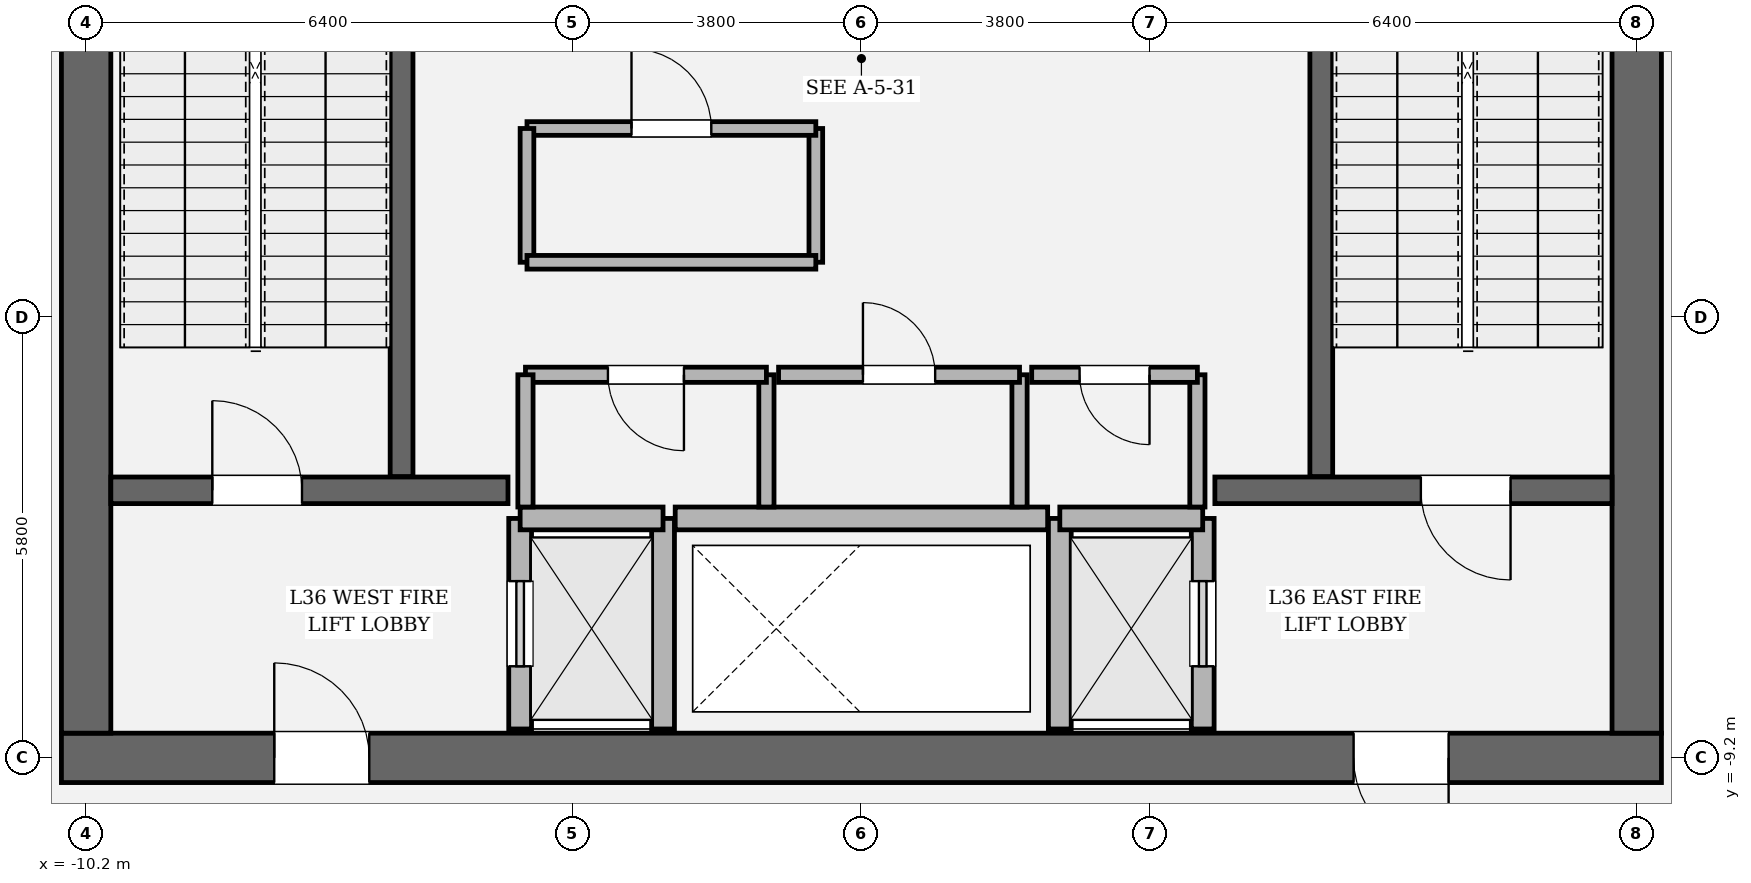
"""IFC4 building model, lengths in metres.
Left out: names, types, materials, properties, quantities, classifications, styles, units other than length and angle.
Written with IfcOpenShell. Run it as: python <this file> out.ifc"""

import sys

from ifc_helpers import new_model, si_unit, direction, frame, frame_2d, origin, place, context, subcontext, project, spatial, rectangle, extrude, element, fill, save


model = new_model("IFC4")
c1 = context("Model", 3, precision=1e-05, world=origin(), true_north=direction((0.0, 1.0)))
c2 = subcontext(c1, "Body", "Model", "MODEL_VIEW")
j1 = project(units=[si_unit("LENGTHUNIT", "METRE"), si_unit("PLANEANGLEUNIT", "RADIAN")], contexts=[c1])
p1 = place(None, origin())
s1 = spatial("IfcSite", under=j1, at=p1, CompositionType="ELEMENT")
p2 = place(p1, origin())
s2 = spatial("IfcBuilding", under=s1, at=p2, CompositionType="ELEMENT")
p3 = place(p2, frame((0.0, 0.0, 156.0)))
s3 = spatial("IfcBuildingStorey", under=s2, at=p3, CompositionType="ELEMENT", Elevation=156.0)
p4 = place(p3, frame((10.525, -9.2, 0.0), z_axis=(0.0, 0.0, 1.0), x_axis=(-1.0, 0.0, 0.0)))
e1 = element("IfcWall", 1, at=p4, inside=s3, PredefinedType="SHEAR", context=c2, shape_type="SweptSolid", body=[
    extrude(rectangle(XDim=21.05, YDim=0.65, at=frame_2d((10.525, 0.0))), origin(), (0.0, 0.0, 1.0), 4.05),
])
p5 = place(p4, frame((2.8, 0.0, 0.0)))
e2 = element("IfcOpeningElement", 2, at=p5, cuts=e1, PredefinedType="OPENING", context=c2, shape_type="SweptSolid", body=[
    extrude(rectangle(XDim=1.25, YDim=2.25, at=frame_2d((0.625, 1.125))), frame((0.0, 0.335, 0.0), z_axis=(0.0, -1.0, 0.0), x_axis=(1.0, 0.0, 0.0)), (0.0, 0.0, 1.0), 0.67),
])
p6 = place(p4, frame((17.0, 0.0, 0.0)))
e3 = element("IfcOpeningElement", 3, at=p6, cuts=e1, PredefinedType="OPENING", context=c2, shape_type="SweptSolid", body=[
    extrude(rectangle(XDim=1.25, YDim=2.25, at=frame_2d((0.625, 1.125))), frame((0.0, 0.335, 0.0), z_axis=(0.0, -1.0, 0.0), x_axis=(1.0, 0.0, 0.0)), (0.0, 0.0, 1.0), 0.67),
])
p7 = place(p3, frame((-10.2, -8.875, 0.0), z_axis=(0.0, 0.0, 1.0), x_axis=(0.0, 1.0, 0.0)))
e4 = element("IfcWall", 4, at=p7, inside=s3, PredefinedType="SHEAR", context=c2, shape_type="SweptSolid", body=[
    extrude(rectangle(XDim=17.75, YDim=0.65, at=frame_2d((8.875, 0.0))), origin(), (0.0, 0.0, 1.0), 4.05),
])
p8 = place(p7, frame((12.665, 0.0, 0.0)))
e5 = element("IfcOpeningElement", 5, at=p8, cuts=e4, PredefinedType="OPENING", context=c2, shape_type="SweptSolid", body=[
    extrude(rectangle(XDim=1.18, YDim=2.2, at=frame_2d((0.59, 1.1))), frame((0.0, 0.335, 0.0), z_axis=(0.0, -1.0, 0.0), x_axis=(1.0, 0.0, 0.0)), (0.0, 0.0, 1.0), 0.67),
])
p9 = place(p3, frame((10.2, 8.875, 0.0), z_axis=(0.0, 0.0, 1.0), x_axis=(0.0, -1.0, 0.0)))
e6 = element("IfcWall", 6, at=p9, inside=s3, PredefinedType="SHEAR", context=c2, shape_type="SweptSolid", body=[
    extrude(rectangle(XDim=17.75, YDim=0.65, at=frame_2d((8.875, 0.0))), origin(), (0.0, 0.0, 1.0), 4.05),
])
p10 = place(p9, frame((3.905, 0.0, 0.0)))
e7 = element("IfcOpeningElement", 7, at=p10, cuts=e6, PredefinedType="OPENING", context=c2, shape_type="SweptSolid", body=[
    extrude(rectangle(XDim=1.18, YDim=2.2, at=frame_2d((0.59, 1.1))), frame((0.0, 0.335, 0.0), z_axis=(0.0, -1.0, 0.0), x_axis=(1.0, 0.0, 0.0)), (0.0, 0.0, 1.0), 0.67),
])
for number, where, z_axis, x_axis in (
    (8, (-6.05, -5.5, 0.0), (0.0, 0.0, 1.0), (0.0, 1.0, 0.0)),
    (9, (6.05, 3.45, 0.0), (0.0, 0.0, 1.0), (0.0, -1.0, 0.0)),
):
    element("IfcWall", number, at=place(p3, frame(where, z_axis=z_axis, x_axis=x_axis)), inside=s3, PredefinedType="SOLIDWALL", context=c2, shape_type="SweptSolid", body=[
        extrude(rectangle(XDim=8.95, YDim=0.3, at=frame_2d((4.475, 0.0))), origin(), (0.0, 0.0, 1.0), 4.05),
    ])
p11 = place(p3, frame((-9.875, -5.68, 0.0), z_axis=(0.0, 0.0, 1.0), x_axis=(1.0, 0.0, 0.0)))
e10 = element("IfcWall", 10, at=p11, inside=s3, PredefinedType="SOLIDWALL", context=c2, shape_type="SweptSolid", body=[
    extrude(rectangle(XDim=5.225, YDim=0.35, at=frame_2d((2.613, 0.0))), origin(), (0.0, 0.0, 1.0), 4.05),
])
p12 = place(p11, frame((1.335, 0.0, 0.0)))
e11 = element("IfcOpeningElement", 11, at=p12, cuts=e10, PredefinedType="OPENING", context=c2, shape_type="SweptSolid", body=[
    extrude(rectangle(XDim=1.18, YDim=2.2, at=frame_2d((0.59, 1.1))), frame((0.0, 0.185, 0.0), z_axis=(0.0, -1.0, 0.0), x_axis=(1.0, 0.0, 0.0)), (0.0, 0.0, 1.0), 0.37),
])
p13 = place(p3, frame((4.65, -5.68, 0.0), z_axis=(0.0, 0.0, 1.0), x_axis=(1.0, 0.0, 0.0)))
e12 = element("IfcWall", 12, at=p13, inside=s3, PredefinedType="SOLIDWALL", context=c2, shape_type="SweptSolid", body=[
    extrude(rectangle(XDim=5.225, YDim=0.35, at=frame_2d((2.613, 0.0))), origin(), (0.0, 0.0, 1.0), 4.05),
])
p14 = place(p13, frame((2.71, 0.0, 0.0)))
e13 = element("IfcOpeningElement", 13, at=p14, cuts=e12, PredefinedType="OPENING", context=c2, shape_type="SweptSolid", body=[
    extrude(rectangle(XDim=1.18, YDim=2.2, at=frame_2d((0.59, 1.1))), frame((0.0, 0.185, 0.0), z_axis=(0.0, -1.0, 0.0), x_axis=(1.0, 0.0, 0.0)), (0.0, 0.0, 1.0), 0.37),
])
p15 = place(p3, frame((-4.49, -8.82, 0.0), z_axis=(0.0, 0.0, 1.0), x_axis=(0.0, 1.0, 0.0)))
e14 = element("IfcWall", 14, at=p15, inside=s3, PredefinedType="SOLIDWALL", context=c2, shape_type="SweptSolid", body=[
    extrude(rectangle(XDim=2.77, YDim=0.3, at=frame_2d((1.385, 0.0))), origin(), (0.0, 0.0, 1.0), 3.83),
])
p16 = place(p15, frame((0.825, 0.0, 0.0)))
e15 = element("IfcOpeningElement", 15, at=p16, cuts=e14, PredefinedType="OPENING", context=c2, shape_type="SweptSolid", body=[
    extrude(rectangle(XDim=1.12, YDim=2.25, at=frame_2d((0.56, 1.125))), frame((0.0, 0.16, 0.0), z_axis=(0.0, -1.0, 0.0), x_axis=(1.0, 0.0, 0.0)), (0.0, 0.0, 1.0), 0.32),
])
p17 = place(p3, frame((-2.61, -8.82, 0.0), z_axis=(0.0, 0.0, 1.0), x_axis=(0.0, 1.0, 0.0)))
e16 = element("IfcWall", 16, at=p17, inside=s3, PredefinedType="SOLIDWALL", context=c2, shape_type="SweptSolid", body=[
    extrude(rectangle(XDim=2.77, YDim=0.3, at=frame_2d((1.385, 0.0))), origin(), (0.0, 0.0, 1.0), 3.83),
])
p18 = place(p3, frame((-4.49, -6.05, 0.0), z_axis=(0.0, 0.0, 1.0), x_axis=(1.0, 0.0, 0.0)))
e17 = element("IfcWall", 17, at=p18, inside=s3, PredefinedType="SOLIDWALL", context=c2, shape_type="SweptSolid", body=[
    extrude(rectangle(XDim=1.88, YDim=0.3, at=frame_2d((0.94, 0.0))), origin(), (0.0, 0.0, 1.0), 3.83),
])
p19 = place(p3, frame((4.49, -8.82, 0.0), z_axis=(0.0, 0.0, 1.0), x_axis=(0.0, 1.0, 0.0)))
e18 = element("IfcWall", 18, at=p19, inside=s3, PredefinedType="SOLIDWALL", context=c2, shape_type="SweptSolid", body=[
    extrude(rectangle(XDim=2.77, YDim=0.3, at=frame_2d((1.385, 0.0))), origin(), (0.0, 0.0, 1.0), 3.83),
])
p20 = place(p19, frame((0.825, 0.0, 0.0)))
e19 = element("IfcOpeningElement", 19, at=p20, cuts=e18, PredefinedType="OPENING", context=c2, shape_type="SweptSolid", body=[
    extrude(rectangle(XDim=1.12, YDim=2.25, at=frame_2d((0.56, 1.125))), frame((0.0, 0.16, 0.0), z_axis=(0.0, -1.0, 0.0), x_axis=(1.0, 0.0, 0.0)), (0.0, 0.0, 1.0), 0.32),
])
p21 = place(p3, frame((2.61, -8.82, 0.0), z_axis=(0.0, 0.0, 1.0), x_axis=(0.0, 1.0, 0.0)))
e20 = element("IfcWall", 20, at=p21, inside=s3, PredefinedType="SOLIDWALL", context=c2, shape_type="SweptSolid", body=[
    extrude(rectangle(XDim=2.77, YDim=0.3, at=frame_2d((1.385, 0.0))), origin(), (0.0, 0.0, 1.0), 3.83),
])
p22 = place(p3, frame((2.61, -6.05, 0.0), z_axis=(0.0, 0.0, 1.0), x_axis=(1.0, 0.0, 0.0)))
e21 = element("IfcWall", 21, at=p22, inside=s3, PredefinedType="SOLIDWALL", context=c2, shape_type="SweptSolid", body=[
    extrude(rectangle(XDim=1.88, YDim=0.3, at=frame_2d((0.94, 0.0))), origin(), (0.0, 0.0, 1.0), 3.83),
])
p23 = place(p3, frame((-2.45, -6.05, 0.0), z_axis=(0.0, 0.0, 1.0), x_axis=(1.0, 0.0, 0.0)))
e22 = element("IfcWall", 22, at=p23, inside=s3, PredefinedType="SOLIDWALL", context=c2, shape_type="SweptSolid", body=[
    extrude(rectangle(XDim=4.9, YDim=0.3, at=frame_2d((2.45, 0.0))), origin(), (0.0, 0.0, 1.0), 3.83),
])
p24 = place(p3, frame((-1.25, -5.9, 0.0), z_axis=(0.0, 0.0, 1.0), x_axis=(0.0, 1.0, 0.0)))
e23 = element("IfcWall", 23, at=p24, inside=s3, PredefinedType="SOLIDWALL", context=c2, shape_type="SweptSolid", body=[
    extrude(rectangle(XDim=1.74, YDim=0.2, at=frame_2d((0.87, 0.0))), origin(), (0.0, 0.0, 1.0), 3.83),
])
p25 = place(p3, frame((-1.25, -4.16, 0.0), z_axis=(0.0, 0.0, 1.0), x_axis=(-1.0, 0.0, 0.0)))
e24 = element("IfcWall", 24, at=p25, inside=s3, PredefinedType="SOLIDWALL", context=c2, shape_type="SweptSolid", body=[
    extrude(rectangle(XDim=3.17, YDim=0.2, at=frame_2d((1.585, 0.0))), origin(), (0.0, 0.0, 1.0), 3.83),
])
p26 = place(p25, frame((1.085, 0.0, 0.0)))
e25 = element("IfcOpeningElement", 25, at=p26, cuts=e24, PredefinedType="OPENING", context=c2, shape_type="SweptSolid", body=[
    extrude(rectangle(XDim=1.0, YDim=2.15, at=frame_2d((0.5, 1.075))), frame((0.0, 0.11, 0.0), z_axis=(0.0, -1.0, 0.0), x_axis=(1.0, 0.0, 0.0)), (0.0, 0.0, 1.0), 0.22),
])
for number, where, z_axis, x_axis in (
    (26, (-4.42, -4.16, 0.0), (0.0, 0.0, 1.0), (0.0, -1.0, 0.0)),
    (27, (2.08, -5.9, 0.0), (0.0, 0.0, 1.0), (0.0, 1.0, 0.0)),
):
    element("IfcWall", number, at=place(p3, frame(where, z_axis=z_axis, x_axis=x_axis)), inside=s3, PredefinedType="SOLIDWALL", context=c2, shape_type="SweptSolid", body=[
        extrude(rectangle(XDim=1.74, YDim=0.2, at=frame_2d((0.87, 0.0))), origin(), (0.0, 0.0, 1.0), 3.83),
    ])
p27 = place(p3, frame((2.08, -4.16, 0.0), z_axis=(0.0, 0.0, 1.0), x_axis=(-1.0, 0.0, 0.0)))
e28 = element("IfcWall", 28, at=p27, inside=s3, PredefinedType="SOLIDWALL", context=c2, shape_type="SweptSolid", body=[
    extrude(rectangle(XDim=3.17, YDim=0.2, at=frame_2d((1.585, 0.0))), origin(), (0.0, 0.0, 1.0), 3.83),
])
p28 = place(p27, frame((1.11, 0.0, 0.0)))
e29 = element("IfcOpeningElement", 29, at=p28, cuts=e28, PredefinedType="OPENING", context=c2, shape_type="SweptSolid", body=[
    extrude(rectangle(XDim=0.95, YDim=2.15, at=frame_2d((0.475, 1.075))), frame((0.0, 0.11, 0.0), z_axis=(0.0, -1.0, 0.0), x_axis=(1.0, 0.0, 0.0)), (0.0, 0.0, 1.0), 0.22),
])
p29 = place(p3, frame((4.42, -5.9, 0.0), z_axis=(0.0, 0.0, 1.0), x_axis=(0.0, 1.0, 0.0)))
e30 = element("IfcWall", 30, at=p29, inside=s3, PredefinedType="SOLIDWALL", context=c2, shape_type="SweptSolid", body=[
    extrude(rectangle(XDim=1.74, YDim=0.2, at=frame_2d((0.87, 0.0))), origin(), (0.0, 0.0, 1.0), 3.83),
])
p30 = place(p3, frame((4.42, -4.16, 0.0), z_axis=(0.0, 0.0, 1.0), x_axis=(-1.0, 0.0, 0.0)))
e31 = element("IfcWall", 31, at=p30, inside=s3, PredefinedType="SOLIDWALL", context=c2, shape_type="SweptSolid", body=[
    extrude(rectangle(XDim=2.18, YDim=0.2, at=frame_2d((1.09, 0.0))), origin(), (0.0, 0.0, 1.0), 3.83),
])
p31 = place(p30, frame((0.63, 0.0, 0.0)))
e32 = element("IfcOpeningElement", 32, at=p31, cuts=e31, PredefinedType="OPENING", context=c2, shape_type="SweptSolid", body=[
    extrude(rectangle(XDim=0.92, YDim=2.1, at=frame_2d((0.46, 1.05))), frame((0.0, 0.11, 0.0), z_axis=(0.0, -1.0, 0.0), x_axis=(1.0, 0.0, 0.0)), (0.0, 0.0, 1.0), 0.22),
])
p32 = place(p3, frame((-0.6, -2.68, 0.0), z_axis=(0.0, 0.0, 1.0), x_axis=(0.0, 1.0, 0.0)))
e33 = element("IfcWall", 33, at=p32, inside=s3, PredefinedType="PARTITIONING", context=c2, shape_type="SweptSolid", body=[
    extrude(rectangle(XDim=1.76, YDim=0.18, at=frame_2d((0.88, 0.0))), origin(), (0.0, 0.0, 1.0), 3.83),
])
p33 = place(p3, frame((-0.6, -0.92, 0.0), z_axis=(0.0, 0.0, 1.0), x_axis=(-1.0, 0.0, 0.0)))
e34 = element("IfcWall", 34, at=p33, inside=s3, PredefinedType="PARTITIONING", context=c2, shape_type="SweptSolid", body=[
    extrude(rectangle(XDim=3.8, YDim=0.18, at=frame_2d((1.9, 0.0))), origin(), (0.0, 0.0, 1.0), 3.83),
])
p34 = place(p33, frame((1.375, 0.0, 0.0)))
e35 = element("IfcOpeningElement", 35, at=p34, cuts=e34, PredefinedType="OPENING", context=c2, shape_type="SweptSolid", body=[
    extrude(rectangle(XDim=1.05, YDim=2.2, at=frame_2d((0.525, 1.1))), frame((0.0, 0.1, 0.0), z_axis=(0.0, -1.0, 0.0), x_axis=(1.0, 0.0, 0.0)), (0.0, 0.0, 1.0), 0.2),
])
p35 = place(p3, frame((-4.4, -0.92, 0.0), z_axis=(0.0, 0.0, 1.0), x_axis=(0.0, -1.0, 0.0)))
e36 = element("IfcWall", 36, at=p35, inside=s3, PredefinedType="PARTITIONING", context=c2, shape_type="SweptSolid", body=[
    extrude(rectangle(XDim=1.76, YDim=0.18, at=frame_2d((0.88, 0.0))), origin(), (0.0, 0.0, 1.0), 3.83),
])
p36 = place(p3, frame((-4.4, -2.68, 0.0), z_axis=(0.0, 0.0, 1.0), x_axis=(1.0, 0.0, 0.0)))
e37 = element("IfcWall", 37, at=p36, inside=s3, PredefinedType="PARTITIONING", context=c2, shape_type="SweptSolid", body=[
    extrude(rectangle(XDim=3.8, YDim=0.18, at=frame_2d((1.9, 0.0))), origin(), (0.0, 0.0, 1.0), 3.83),
])
p37 = place(p12, origin())
e38 = element("IfcDoor", 38, at=p37, inside=s3, OperationType="SINGLE_SWING_LEFT", PredefinedType="DOOR", context=c2, shape_type="SweptSolid", body=[
    extrude(rectangle(XDim=1.18, YDim=2.2, at=frame_2d((0.59, 1.1))), frame((0.0, 0.025, 0.0), z_axis=(0.0, -1.0, 0.0), x_axis=(1.0, 0.0, 0.0)), (0.0, 0.0, 1.0), 0.05),
])
fill(e11, e38)
p38 = place(p14, origin())
e39 = element("IfcDoor", 39, at=p38, inside=s3, OperationType="SINGLE_SWING_RIGHT", PredefinedType="DOOR", context=c2, shape_type="SweptSolid", body=[
    extrude(rectangle(XDim=1.18, YDim=2.2, at=frame_2d((0.59, 1.1))), frame((0.0, 0.025, 0.0), z_axis=(0.0, -1.0, 0.0), x_axis=(1.0, 0.0, 0.0)), (0.0, 0.0, 1.0), 0.05),
])
fill(e13, e39)
p39 = place(p5, origin())
e40 = element("IfcDoor", 40, at=p39, inside=s3, OperationType="SINGLE_SWING_LEFT", PredefinedType="DOOR", context=c2, shape_type="SweptSolid", body=[
    extrude(rectangle(XDim=1.25, YDim=2.25, at=frame_2d((0.625, 1.125))), frame((0.0, 0.025, 0.0), z_axis=(0.0, -1.0, 0.0), x_axis=(1.0, 0.0, 0.0)), (0.0, 0.0, 1.0), 0.05),
])
fill(e2, e40)
p40 = place(p6, origin())
e41 = element("IfcDoor", 41, at=p40, inside=s3, OperationType="SINGLE_SWING_RIGHT", PredefinedType="DOOR", context=c2, shape_type="SweptSolid", body=[
    extrude(rectangle(XDim=1.25, YDim=2.25, at=frame_2d((0.625, 1.125))), frame((0.0, 0.025, 0.0), z_axis=(0.0, -1.0, 0.0), x_axis=(1.0, 0.0, 0.0)), (0.0, 0.0, 1.0), 0.05),
])
fill(e3, e41)
p41 = place(p16, origin())
e42 = element("IfcDoor", 42, at=p41, inside=s3, OperationType="SLIDING_TO_LEFT", PredefinedType="DOOR", context=c2, shape_type="SweptSolid", body=[
    extrude(rectangle(XDim=1.12, YDim=2.25, at=frame_2d((0.56, 1.125))), frame((0.0, 0.025, 0.0), z_axis=(0.0, -1.0, 0.0), x_axis=(1.0, 0.0, 0.0)), (0.0, 0.0, 1.0), 0.05),
])
fill(e15, e42)
p42 = place(p20, origin())
e43 = element("IfcDoor", 43, at=p42, inside=s3, OperationType="SLIDING_TO_RIGHT", PredefinedType="DOOR", context=c2, shape_type="SweptSolid", body=[
    extrude(rectangle(XDim=1.12, YDim=2.25, at=frame_2d((0.56, 1.125))), frame((0.0, 0.025, 0.0), z_axis=(0.0, -1.0, 0.0), x_axis=(1.0, 0.0, 0.0)), (0.0, 0.0, 1.0), 0.05),
])
fill(e19, e43)
p43 = place(p26, origin())
e44 = element("IfcDoor", 44, at=p43, inside=s3, OperationType="SINGLE_SWING_LEFT", PredefinedType="DOOR", context=c2, shape_type="SweptSolid", body=[
    extrude(rectangle(XDim=1.0, YDim=2.15, at=frame_2d((0.5, 1.075))), frame((0.0, 0.025, 0.0), z_axis=(0.0, -1.0, 0.0), x_axis=(1.0, 0.0, 0.0)), (0.0, 0.0, 1.0), 0.05),
])
fill(e25, e44)
p44 = place(p28, origin())
e45 = element("IfcDoor", 45, at=p44, inside=s3, OperationType="SINGLE_SWING_RIGHT", PredefinedType="DOOR", context=c2, shape_type="SweptSolid", body=[
    extrude(rectangle(XDim=0.95, YDim=2.15, at=frame_2d((0.475, 1.075))), frame((0.0, 0.025, 0.0), z_axis=(0.0, -1.0, 0.0), x_axis=(1.0, 0.0, 0.0)), (0.0, 0.0, 1.0), 0.05),
])
fill(e29, e45)
p45 = place(p31, origin())
e46 = element("IfcDoor", 46, at=p45, inside=s3, OperationType="SINGLE_SWING_LEFT", PredefinedType="DOOR", context=c2, shape_type="SweptSolid", body=[
    extrude(rectangle(XDim=0.92, YDim=2.1, at=frame_2d((0.46, 1.05))), frame((0.0, 0.025, 0.0), z_axis=(0.0, -1.0, 0.0), x_axis=(1.0, 0.0, 0.0)), (0.0, 0.0, 1.0), 0.05),
])
fill(e32, e46)
p46 = place(p34, origin())
e47 = element("IfcDoor", 47, at=p46, inside=s3, OperationType="SINGLE_SWING_RIGHT", PredefinedType="DOOR", context=c2, shape_type="SweptSolid", body=[
    extrude(rectangle(XDim=1.05, YDim=2.2, at=frame_2d((0.525, 1.1))), frame((0.0, 0.025, 0.0), z_axis=(0.0, -1.0, 0.0), x_axis=(1.0, 0.0, 0.0)), (0.0, 0.0, 1.0), 0.05),
])
fill(e35, e47)
save(model, sys.argv[1])
